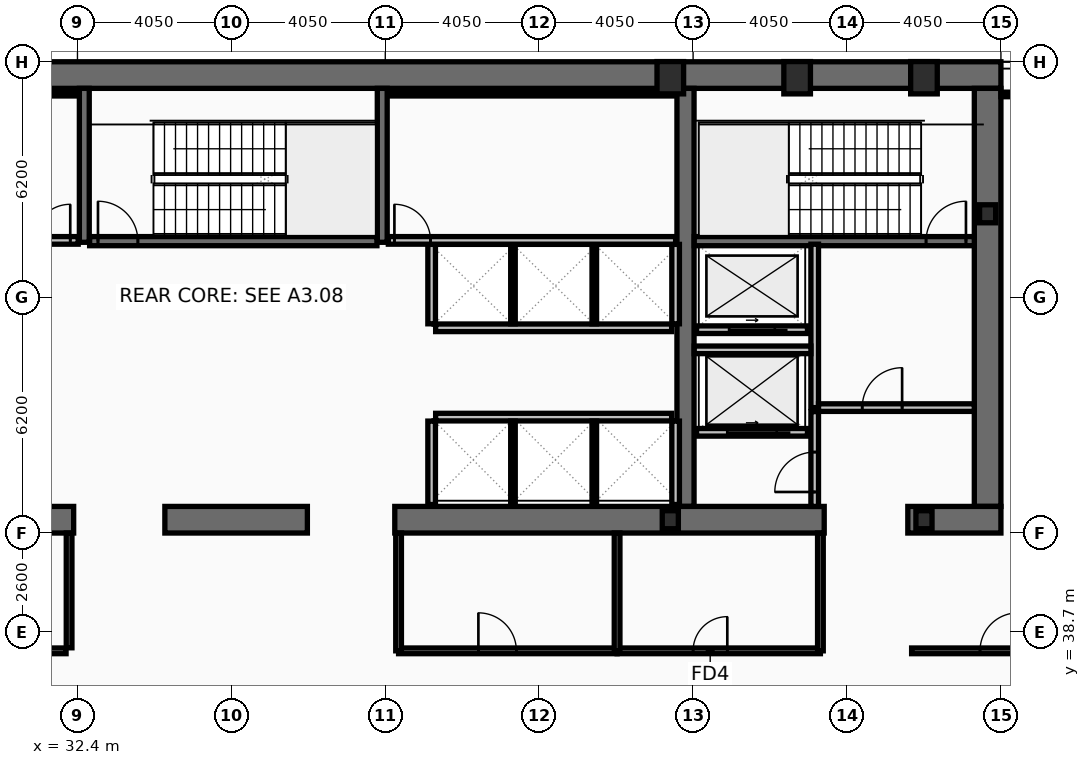
"""IFC4 building model, lengths in metres.
Left out: names, types, materials, properties, quantities, classifications, styles, units other than length and angle.
Written with IfcOpenShell. Run it as: python <this file> out.ifc"""

import sys

from ifc_helpers import new_model, si_unit, direction, frame, frame_2d, origin, origin_2d, place, context, subcontext, project, spatial, rectangle, hollow_rectangle, i_section, extrude, element, fill, save


model = new_model("IFC4")
c1 = context("Model", 3, precision=1e-05, world=origin(), true_north=direction((0.0, 1.0)))
c2 = subcontext(c1, "Body", "Model", "MODEL_VIEW")
j1 = project(units=[si_unit("LENGTHUNIT", "METRE"), si_unit("PLANEANGLEUNIT", "RADIAN")], contexts=[c1])
p1 = place(None, origin())
s1 = spatial("IfcSite", under=j1, at=p1, CompositionType="ELEMENT")
p2 = place(p1, origin())
s2 = spatial("IfcBuilding", under=s1, at=p2, CompositionType="ELEMENT")
p3 = place(p2, frame((0.0, 0.0, 106.6)))
s3 = spatial("IfcBuildingStorey", under=s2, at=p3, CompositionType="ELEMENT", Elevation=106.6)
p4 = place(p3, frame((16.2, 53.35, 0.0), z_axis=(0.0, 0.0, 1.0), x_axis=(1.0, 0.0, 0.0)))
e1 = element("IfcWall", 1, at=p4, inside=s3, PredefinedType="SHEAR", context=c2, shape_type="SweptSolid", body=[
    extrude(rectangle(XDim=40.5, YDim=0.7, at=frame_2d((20.25, 0.0))), origin(), (0.0, 0.0, 1.0), 4.24),
])
p5 = place(p3, frame((56.35, 53.0, 0.0), z_axis=(0.0, 0.0, 1.0), x_axis=(0.0, -1.0, 0.0)))
e2 = element("IfcWall", 2, at=p5, inside=s3, PredefinedType="SHEAR", context=c2, shape_type="SweptSolid", body=[
    extrude(rectangle(XDim=11.0, YDim=0.7, at=frame_2d((5.5, 0.0))), origin(), (0.0, 0.0, 1.0), 4.24),
])
p6 = place(p3, frame((48.4, 42.0, 0.0), z_axis=(0.0, 0.0, 1.0), x_axis=(0.0, 1.0, 0.0)))
e3 = element("IfcWall", 3, at=p6, inside=s3, PredefinedType="SHEAR", context=c2, shape_type="SweptSolid", body=[
    extrude(rectangle(XDim=11.0, YDim=0.45, at=frame_2d((5.5, 0.0))), origin(), (0.0, 0.0, 1.0), 4.24),
])
p7 = place(p3, frame((32.3, 41.65, 0.0), z_axis=(0.0, 0.0, 1.0), x_axis=(-1.0, 0.0, 0.0)))
e4 = element("IfcWall", 4, at=p7, inside=s3, PredefinedType="SHEAR", context=c2, shape_type="SweptSolid", body=[
    extrude(rectangle(XDim=11.45, YDim=0.7, at=frame_2d((5.725, 0.0))), origin(), (0.0, 0.0, 1.0), 4.24),
])
p8 = place(p3, frame((38.45, 41.65, 0.0), z_axis=(0.0, 0.0, 1.0), x_axis=(-1.0, 0.0, 0.0)))
e5 = element("IfcWall", 5, at=p8, inside=s3, PredefinedType="SHEAR", context=c2, shape_type="SweptSolid", body=[
    extrude(rectangle(XDim=3.75, YDim=0.7, at=frame_2d((1.875, 0.0))), origin(), (0.0, 0.0, 1.0), 4.24),
])
p9 = place(p3, frame((52.05, 41.65, 0.0), z_axis=(0.0, 0.0, 1.0), x_axis=(-1.0, 0.0, 0.0)))
e6 = element("IfcWall", 6, at=p9, inside=s3, PredefinedType="SHEAR", context=c2, shape_type="SweptSolid", body=[
    extrude(rectangle(XDim=11.3, YDim=0.7, at=frame_2d((5.65, 0.0))), origin(), (0.0, 0.0, 1.0), 4.24),
])
p10 = place(p3, frame((56.7, 41.65, 0.0), z_axis=(0.0, 0.0, 1.0), x_axis=(-1.0, 0.0, 0.0)))
e7 = element("IfcWall", 7, at=p10, inside=s3, PredefinedType="SHEAR", context=c2, shape_type="SweptSolid", body=[
    extrude(rectangle(XDim=2.45, YDim=0.7, at=frame_2d((1.225, 0.0))), origin(), (0.0, 0.0, 1.0), 4.24),
])
for number, where, z_axis, x_axis in (
    (8, (32.58, 48.95, 0.0), (0.0, 0.0, 1.0), (0.0, 1.0, 0.0)),
    (9, (40.42, 48.95, 0.0), (0.0, 0.0, 1.0), (0.0, 1.0, 0.0)),
):
    element("IfcWall", number, at=place(p3, frame(where, z_axis=z_axis, x_axis=x_axis)), inside=s3, PredefinedType="SHEAR", context=c2, shape_type="SweptSolid", body=[
        extrude(rectangle(XDim=4.05, YDim=0.26, at=frame_2d((2.025, 0.0))), origin(), (0.0, 0.0, 1.0), 4.24),
    ])
p11 = place(p3, frame((48.63, 48.98, 0.0), z_axis=(0.0, 0.0, 1.0), x_axis=(1.0, 0.0, 0.0)))
e10 = element("IfcWall", 10, at=p11, inside=s3, PredefinedType="SHEAR", context=c2, shape_type="SweptSolid", body=[
    extrude(rectangle(XDim=7.37, YDim=0.24, at=frame_2d((3.685, 0.0))), origin(), (0.0, 0.0, 1.0), 4.24),
])
p12 = place(p11, frame((6.1, 0.0, 0.0)))
e11 = element("IfcOpeningElement", 11, at=p12, cuts=e10, PredefinedType="OPENING", context=c2, shape_type="SweptSolid", body=[
    extrude(rectangle(XDim=1.05, YDim=2.15, at=frame_2d((0.525, 1.075))), frame((0.0, 0.13, 0.0), z_axis=(0.0, -1.0, 0.0), x_axis=(1.0, 0.0, 0.0)), (0.0, 0.0, 1.0), 0.26),
])
p13 = place(p3, frame((32.72, 48.98, 0.0), z_axis=(0.0, 0.0, 1.0), x_axis=(1.0, 0.0, 0.0)))
e12 = element("IfcWall", 12, at=p13, inside=s3, PredefinedType="SHEAR", context=c2, shape_type="SweptSolid", body=[
    extrude(rectangle(XDim=7.56, YDim=0.24, at=frame_2d((3.78, 0.0))), origin(), (0.0, 0.0, 1.0), 4.24),
])
p14 = place(p13, frame((0.22, 0.0, 0.0)))
e13 = element("IfcOpeningElement", 13, at=p14, cuts=e12, PredefinedType="OPENING", context=c2, shape_type="SweptSolid", body=[
    extrude(rectangle(XDim=1.05, YDim=2.15, at=frame_2d((0.525, 1.075))), frame((0.0, 0.13, 0.0), z_axis=(0.0, -1.0, 0.0), x_axis=(1.0, 0.0, 0.0)), (0.0, 0.0, 1.0), 0.26),
])
for number, where, z_axis, x_axis in (
    (14, (48.0, 53.28, 0.0), (0.0, 0.0, 1.0), (1.0, 0.0, 0.0)),
    (15, (51.337, 53.28, 0.0), (0.0, 0.0, 1.0), (1.0, 0.0, 0.0)),
    (16, (54.675, 53.28, 0.0), (0.0, 0.0, 1.0), (1.0, 0.0, 0.0)),
):
    element("IfcColumn", number, at=place(p3, frame(where, z_axis=z_axis, x_axis=x_axis)), inside=s3, PredefinedType="COLUMN", context=c2, shape_type="SweptSolid", body=[
        extrude(hollow_rectangle(XDim=0.7, YDim=0.85, WallThickness=0.05, at=origin_2d()), origin(), (0.0, 0.0, 1.0), 4.4),
    ])
for number, where, z_axis, x_axis in (
    (17, (56.35, 49.7, 0.0), (0.0, 0.0, 1.0), (1.0, 0.0, 0.0)),
    (18, (48.0, 41.65, 0.0), (0.0, 0.0, 1.0), (1.0, 0.0, 0.0)),
    (19, (54.675, 41.65, 0.0), (0.0, 0.0, 1.0), (1.0, 0.0, 0.0)),
):
    element("IfcColumn", number, at=place(p3, frame(where, z_axis=z_axis, x_axis=x_axis)), inside=s3, PredefinedType="COLUMN", context=c2, shape_type="SweptSolid", body=[
        extrude(i_section(OverallWidth=0.424, OverallDepth=0.474, WebThickness=0.048, FlangeThickness=0.077, at=origin_2d()), origin(), (0.0, 0.0, 1.0), 4.4),
    ])
p15 = place(p3, frame((51.61, 43.95, 0.0), z_axis=(0.0, 0.0, 1.0), x_axis=(-1.0, 0.0, 0.0)))
e20 = element("IfcWall", 20, at=p15, inside=s3, PredefinedType="PARTITIONING", context=c2, shape_type="SweptSolid", body=[
    extrude(rectangle(XDim=2.92, YDim=0.2, at=frame_2d((1.46, 0.0))), origin(), (0.0, 0.0, 1.0), 4.24),
])
p16 = place(p15, frame((0.81, 0.0, 0.0)))
e21 = element("IfcOpeningElement", 21, at=p16, cuts=e20, PredefinedType="OPENING", context=c2, shape_type="SweptSolid", body=[
    extrude(rectangle(XDim=1.3, YDim=2.18, at=frame_2d((0.65, 1.09))), frame((0.0, 0.11, 0.0), z_axis=(0.0, -1.0, 0.0), x_axis=(1.0, 0.0, 0.0)), (0.0, 0.0, 1.0), 0.22),
])
p17 = place(p3, frame((51.61, 46.65, 0.0), z_axis=(0.0, 0.0, 1.0), x_axis=(-1.0, 0.0, 0.0)))
e22 = element("IfcWall", 22, at=p17, inside=s3, PredefinedType="PARTITIONING", context=c2, shape_type="SweptSolid", body=[
    extrude(rectangle(XDim=2.92, YDim=0.2, at=frame_2d((1.46, 0.0))), origin(), (0.0, 0.0, 1.0), 4.24),
])
p18 = place(p17, frame((0.86, 0.0, 0.0)))
e23 = element("IfcOpeningElement", 23, at=p18, cuts=e22, PredefinedType="OPENING", context=c2, shape_type="SweptSolid", body=[
    extrude(rectangle(XDim=1.2, YDim=2.18, at=frame_2d((0.6, 1.09))), frame((0.0, 0.11, 0.0), z_axis=(0.0, -1.0, 0.0), x_axis=(1.0, 0.0, 0.0)), (0.0, 0.0, 1.0), 0.22),
])
p19 = place(p3, frame((51.8, 44.6, 0.0), z_axis=(0.0, 0.0, 1.0), x_axis=(0.0, 1.0, 0.0)))
e24 = element("IfcWall", 24, at=p19, inside=s3, PredefinedType="PARTITIONING", context=c2, shape_type="SweptSolid", body=[
    extrude(rectangle(XDim=4.3, YDim=0.2, at=frame_2d((2.15, 0.0))), origin(), (0.0, 0.0, 1.0), 4.24),
])
p20 = place(p3, frame((51.9, 44.6, 0.0), z_axis=(0.0, 0.0, 1.0), x_axis=(1.0, 0.0, 0.0)))
e25 = element("IfcWall", 25, at=p20, inside=s3, PredefinedType="PARTITIONING", context=c2, shape_type="SweptSolid", body=[
    extrude(rectangle(XDim=4.1, YDim=0.2, at=frame_2d((2.05, 0.0))), origin(), (0.0, 0.0, 1.0), 4.24),
])
p21 = place(p20, frame((1.15, 0.0, 0.0)))
e26 = element("IfcOpeningElement", 26, at=p21, cuts=e25, PredefinedType="OPENING", context=c2, shape_type="SweptSolid", body=[
    extrude(rectangle(XDim=1.05, YDim=2.15, at=frame_2d((0.525, 1.075))), frame((0.0, 0.11, 0.0), z_axis=(0.0, -1.0, 0.0), x_axis=(1.0, 0.0, 0.0)), (0.0, 0.0, 1.0), 0.22),
])
p22 = place(p3, frame((48.63, 46.12, 0.0), z_axis=(0.0, 0.0, 1.0), x_axis=(1.0, 0.0, 0.0)))
e27 = element("IfcWall", 27, at=p22, inside=s3, PredefinedType="PARTITIONING", context=c2, shape_type="SweptSolid", body=[
    extrude(rectangle(XDim=3.07, YDim=0.2, at=frame_2d((1.535, 0.0))), origin(), (0.0, 0.0, 1.0), 4.24),
])
p23 = place(p3, frame((51.8, 42.0, 0.0), z_axis=(0.0, 0.0, 1.0), x_axis=(0.0, 1.0, 0.0)))
e28 = element("IfcWall", 28, at=p23, inside=s3, PredefinedType="PARTITIONING", context=c2, shape_type="SweptSolid", body=[
    extrude(rectangle(XDim=2.495, YDim=0.2, at=frame_2d((1.248, 0.0))), origin(), (0.0, 0.0, 1.0), 4.24),
])
p24 = place(p23, frame((0.38, 0.0, 0.0)))
e29 = element("IfcOpeningElement", 29, at=p24, cuts=e28, PredefinedType="OPENING", context=c2, shape_type="SweptSolid", body=[
    extrude(rectangle(XDim=1.05, YDim=2.15, at=frame_2d((0.525, 1.075))), frame((0.0, 0.11, 0.0), z_axis=(0.0, -1.0, 0.0), x_axis=(1.0, 0.0, 0.0)), (0.0, 0.0, 1.0), 0.22),
])
p25 = place(p3, frame((41.825, 46.7, 0.0), z_axis=(0.0, 0.0, 1.0), x_axis=(1.0, 0.0, 0.0)))
e30 = element("IfcWall", 30, at=p25, inside=s3, PredefinedType="PARTITIONING", context=c2, shape_type="SweptSolid", body=[
    extrude(rectangle(XDim=6.21, YDim=0.2, at=frame_2d((3.105, 0.0))), origin(), (0.0, 0.0, 1.0), 4.24),
])
for number, where, z_axis, x_axis in (
    (31, (41.72, 46.805, 0.0), (0.0, 0.0, 1.0), (0.0, 1.0, 0.0)),
    (32, (48.14, 46.805, 0.0), (0.0, 0.0, 1.0), (0.0, 1.0, 0.0)),
):
    element("IfcWall", number, at=place(p3, frame(where, z_axis=z_axis, x_axis=x_axis)), inside=s3, PredefinedType="PARTITIONING", context=c2, shape_type="SweptSolid", body=[
        extrude(rectangle(XDim=2.09, YDim=0.2, at=frame_2d((1.045, 0.0))), origin(), (0.0, 0.0, 1.0), 4.24),
    ])
for number, where, z_axis, x_axis in (
    (33, (43.86, 46.805, 0.0), (0.0, 0.0, 1.0), (0.0, 1.0, 0.0)),
    (34, (46.0, 46.805, 0.0), (0.0, 0.0, 1.0), (0.0, 1.0, 0.0)),
):
    element("IfcWall", number, at=place(p3, frame(where, z_axis=z_axis, x_axis=x_axis)), inside=s3, PredefinedType="PARTITIONING", context=c2, shape_type="SweptSolid", body=[
        extrude(rectangle(XDim=2.09, YDim=0.12, at=frame_2d((1.045, 0.0))), origin(), (0.0, 0.0, 1.0), 4.24),
    ])
p26 = place(p3, frame((41.825, 44.35, 0.0), z_axis=(0.0, 0.0, 1.0), x_axis=(1.0, 0.0, 0.0)))
e35 = element("IfcWall", 35, at=p26, inside=s3, PredefinedType="PARTITIONING", context=c2, shape_type="SweptSolid", body=[
    extrude(rectangle(XDim=6.21, YDim=0.2, at=frame_2d((3.105, 0.0))), origin(), (0.0, 0.0, 1.0), 4.24),
])
for number, where, z_axis, x_axis in (
    (36, (41.72, 42.05, 0.0), (0.0, 0.0, 1.0), (0.0, 1.0, 0.0)),
    (37, (48.14, 42.05, 0.0), (0.0, 0.0, 1.0), (0.0, 1.0, 0.0)),
):
    element("IfcWall", number, at=place(p3, frame(where, z_axis=z_axis, x_axis=x_axis)), inside=s3, PredefinedType="PARTITIONING", context=c2, shape_type="SweptSolid", body=[
        extrude(rectangle(XDim=2.195, YDim=0.2, at=frame_2d((1.098, 0.0))), origin(), (0.0, 0.0, 1.0), 4.24),
    ])
for number, where, z_axis, x_axis in (
    (38, (43.86, 42.05, 0.0), (0.0, 0.0, 1.0), (0.0, 1.0, 0.0)),
    (39, (46.0, 42.05, 0.0), (0.0, 0.0, 1.0), (0.0, 1.0, 0.0)),
):
    element("IfcWall", number, at=place(p3, frame(where, z_axis=z_axis, x_axis=x_axis)), inside=s3, PredefinedType="PARTITIONING", context=c2, shape_type="SweptSolid", body=[
        extrude(rectangle(XDim=2.195, YDim=0.12, at=frame_2d((1.098, 0.0))), origin(), (0.0, 0.0, 1.0), 4.24),
    ])
p27 = place(p3, frame((24.7, 52.86, 0.0), z_axis=(0.0, 0.0, 1.0), x_axis=(1.0, 0.0, 0.0)))
e40 = element("IfcWall", 40, at=p27, inside=s3, PredefinedType="PARTITIONING", context=c2, shape_type="SweptSolid", body=[
    extrude(rectangle(XDim=7.72, YDim=0.12, at=frame_2d((3.86, 0.0))), origin(), (0.0, 0.0, 1.0), 4.24),
])
p28 = place(p3, frame((24.7, 49.0, 0.0), z_axis=(0.0, 0.0, 1.0), x_axis=(1.0, 0.0, 0.0)))
e41 = element("IfcWall", 41, at=p28, inside=s3, PredefinedType="PARTITIONING", context=c2, shape_type="SweptSolid", body=[
    extrude(rectangle(XDim=7.72, YDim=0.2, at=frame_2d((3.86, 0.0))), origin(), (0.0, 0.0, 1.0), 4.24),
])
p29 = place(p28, frame((6.56, 0.0, 0.0)))
e42 = element("IfcOpeningElement", 42, at=p29, cuts=e41, PredefinedType="OPENING", context=c2, shape_type="SweptSolid", body=[
    extrude(rectangle(XDim=0.95, YDim=2.1, at=frame_2d((0.475, 1.05))), frame((0.0, 0.11, 0.0), z_axis=(0.0, -1.0, 0.0), x_axis=(1.0, 0.0, 0.0)), (0.0, 0.0, 1.0), 0.22),
])
p30 = place(p3, frame((40.58, 52.86, 0.0), z_axis=(0.0, 0.0, 1.0), x_axis=(1.0, 0.0, 0.0)))
e43 = element("IfcWall", 43, at=p30, inside=s3, PredefinedType="PARTITIONING", context=c2, shape_type="SweptSolid", body=[
    extrude(rectangle(XDim=7.56, YDim=0.12, at=frame_2d((3.78, 0.0))), origin(), (0.0, 0.0, 1.0), 4.24),
])
p31 = place(p3, frame((40.58, 49.0, 0.0), z_axis=(0.0, 0.0, 1.0), x_axis=(1.0, 0.0, 0.0)))
e44 = element("IfcWall", 44, at=p31, inside=s3, PredefinedType="PARTITIONING", context=c2, shape_type="SweptSolid", body=[
    extrude(rectangle(XDim=7.56, YDim=0.2, at=frame_2d((3.78, 0.0))), origin(), (0.0, 0.0, 1.0), 4.24),
])
p32 = place(p31, frame((0.16, 0.0, 0.0)))
e45 = element("IfcOpeningElement", 45, at=p32, cuts=e44, PredefinedType="OPENING", context=c2, shape_type="SweptSolid", body=[
    extrude(rectangle(XDim=0.95, YDim=2.1, at=frame_2d((0.475, 1.05))), frame((0.0, 0.11, 0.0), z_axis=(0.0, -1.0, 0.0), x_axis=(1.0, 0.0, 0.0)), (0.0, 0.0, 1.0), 0.22),
])
p33 = place(p3, frame((29.08, 38.2, 0.0), z_axis=(0.0, 0.0, 1.0), x_axis=(1.0, 0.0, 0.0)))
e46 = element("IfcWall", 46, at=p33, inside=s3, PredefinedType="PARTITIONING", context=c2, shape_type="SweptSolid", body=[
    extrude(rectangle(XDim=3.02, YDim=0.15, at=frame_2d((1.51, 0.0))), origin(), (0.0, 0.0, 1.0), 3.53),
])
p34 = place(p33, frame((1.0, 0.0, 0.0)))
e47 = element("IfcOpeningElement", 47, at=p34, cuts=e46, PredefinedType="OPENING", context=c2, shape_type="SweptSolid", body=[
    extrude(rectangle(XDim=0.95, YDim=2.05, at=frame_2d((0.475, 1.025))), frame((0.0, 0.085, 0.0), z_axis=(0.0, -1.0, 0.0), x_axis=(1.0, 0.0, 0.0)), (0.0, 0.0, 1.0), 0.17),
])
p35 = place(p3, frame((32.18, 38.28, 0.0), z_axis=(0.0, 0.0, 1.0), x_axis=(0.0, 1.0, 0.0)))
e48 = element("IfcWall", 48, at=p35, inside=s3, PredefinedType="PARTITIONING", context=c2, shape_type="SweptSolid", body=[
    extrude(rectangle(XDim=3.02, YDim=0.15, at=frame_2d((1.51, 0.0))), origin(), (0.0, 0.0, 1.0), 4.24),
])
p36 = place(p3, frame((40.85, 38.2, 0.0), z_axis=(0.0, 0.0, 1.0), x_axis=(1.0, 0.0, 0.0)))
e49 = element("IfcWall", 49, at=p36, inside=s3, PredefinedType="PARTITIONING", context=c2, shape_type="SweptSolid", body=[
    extrude(rectangle(XDim=5.75, YDim=0.15, at=frame_2d((2.875, 0.0))), origin(), (0.0, 0.0, 1.0), 3.53),
])
p37 = place(p36, frame((2.1, 0.0, 0.0)))
e50 = element("IfcOpeningElement", 50, at=p37, cuts=e49, PredefinedType="OPENING", context=c2, shape_type="SweptSolid", body=[
    extrude(rectangle(XDim=1.0, YDim=2.05, at=frame_2d((0.5, 1.025))), frame((0.0, 0.085, 0.0), z_axis=(0.0, -1.0, 0.0), x_axis=(1.0, 0.0, 0.0)), (0.0, 0.0, 1.0), 0.17),
])
p38 = place(p3, frame((46.6, 38.2, 0.0), z_axis=(0.0, 0.0, 1.0), x_axis=(1.0, 0.0, 0.0)))
e51 = element("IfcWall", 51, at=p38, inside=s3, PredefinedType="PARTITIONING", context=c2, shape_type="SweptSolid", body=[
    extrude(rectangle(XDim=5.35, YDim=0.15, at=frame_2d((2.675, 0.0))), origin(), (0.0, 0.0, 1.0), 3.53),
])
p39 = place(p38, frame((2.0, 0.0, 0.0)))
e52 = element("IfcOpeningElement", 52, at=p39, cuts=e51, PredefinedType="OPENING", context=c2, shape_type="SweptSolid", body=[
    extrude(rectangle(XDim=0.9, YDim=2.05, at=frame_2d((0.45, 1.025))), frame((0.0, 0.085, 0.0), z_axis=(0.0, -1.0, 0.0), x_axis=(1.0, 0.0, 0.0)), (0.0, 0.0, 1.0), 0.17),
])
for number, where, z_axis, x_axis in (
    (53, (40.85, 38.2, 0.0), (0.0, 0.0, 1.0), (0.0, 1.0, 0.0)),
    (54, (46.6, 38.2, 0.0), (0.0, 0.0, 1.0), (0.0, 1.0, 0.0)),
    (55, (51.95, 38.2, 0.0), (0.0, 0.0, 1.0), (0.0, 1.0, 0.0)),
):
    element("IfcWall", number, at=place(p3, frame(where, z_axis=z_axis, x_axis=x_axis)), inside=s3, PredefinedType="PARTITIONING", context=c2, shape_type="SweptSolid", body=[
        extrude(rectangle(XDim=3.1, YDim=0.15, at=frame_2d((1.55, 0.0))), origin(), (0.0, 0.0, 1.0), 4.24),
    ])
p40 = place(p3, frame((54.35, 38.2, 0.0), z_axis=(0.0, 0.0, 1.0), x_axis=(1.0, 0.0, 0.0)))
e56 = element("IfcWall", 56, at=p40, inside=s3, PredefinedType="PARTITIONING", context=c2, shape_type="SweptSolid", body=[
    extrude(rectangle(XDim=14.52, YDim=0.15, at=frame_2d((7.26, 0.0))), origin(), (0.0, 0.0, 1.0), 3.53),
])
p41 = place(p40, frame((1.8, 0.0, 0.0)))
e57 = element("IfcOpeningElement", 57, at=p41, cuts=e56, PredefinedType="OPENING", context=c2, shape_type="SweptSolid", body=[
    extrude(rectangle(XDim=1.0, YDim=2.05, at=frame_2d((0.5, 1.025))), frame((0.0, 0.085, 0.0), z_axis=(0.0, -1.0, 0.0), x_axis=(1.0, 0.0, 0.0)), (0.0, 0.0, 1.0), 0.17),
])
p42 = place(p3, frame((56.7, 52.84, 0.0), z_axis=(0.0, 0.0, 1.0), x_axis=(1.0, 0.0, 0.0)))
e58 = element("IfcWall", 58, at=p42, inside=s3, PredefinedType="PARTITIONING", context=c2, shape_type="SweptSolid", body=[
    extrude(rectangle(XDim=12.105, YDim=0.12, at=frame_2d((6.052, 0.0))), origin(), (0.0, 0.0, 1.0), 4.24),
])
p43 = place(p12, origin())
e59 = element("IfcDoor", 59, at=p43, inside=s3, OperationType="SINGLE_SWING_RIGHT", PredefinedType="DOOR", context=c2, shape_type="SweptSolid", body=[
    extrude(rectangle(XDim=1.05, YDim=2.15, at=frame_2d((0.525, 1.075))), frame((0.0, 0.025, 0.0), z_axis=(0.0, -1.0, 0.0), x_axis=(1.0, 0.0, 0.0)), (0.0, 0.0, 1.0), 0.05),
])
fill(e11, e59)
p44 = place(p14, origin())
e60 = element("IfcDoor", 60, at=p44, inside=s3, OperationType="SINGLE_SWING_LEFT", PredefinedType="DOOR", context=c2, shape_type="SweptSolid", body=[
    extrude(rectangle(XDim=1.05, YDim=2.15, at=frame_2d((0.525, 1.075))), frame((0.0, 0.025, 0.0), z_axis=(0.0, -1.0, 0.0), x_axis=(1.0, 0.0, 0.0)), (0.0, 0.0, 1.0), 0.05),
])
fill(e13, e60)
p45 = place(p16, origin())
e61 = element("IfcDoor", 61, at=p45, inside=s3, OperationType="SLIDING_TO_LEFT", PredefinedType="DOOR", context=c2, shape_type="SweptSolid", body=[
    extrude(rectangle(XDim=1.3, YDim=2.18, at=frame_2d((0.65, 1.09))), frame((0.0, 0.025, 0.0), z_axis=(0.0, -1.0, 0.0), x_axis=(1.0, 0.0, 0.0)), (0.0, 0.0, 1.0), 0.05),
])
fill(e21, e61)
p46 = place(p18, origin())
e62 = element("IfcDoor", 62, at=p46, inside=s3, OperationType="SLIDING_TO_LEFT", PredefinedType="DOOR", context=c2, shape_type="SweptSolid", body=[
    extrude(rectangle(XDim=1.2, YDim=2.18, at=frame_2d((0.6, 1.09))), frame((0.0, 0.025, 0.0), z_axis=(0.0, -1.0, 0.0), x_axis=(1.0, 0.0, 0.0)), (0.0, 0.0, 1.0), 0.05),
])
fill(e23, e62)
p47 = place(p21, origin())
e63 = element("IfcDoor", 63, at=p47, inside=s3, OperationType="SINGLE_SWING_RIGHT", PredefinedType="DOOR", context=c2, shape_type="SweptSolid", body=[
    extrude(rectangle(XDim=1.05, YDim=2.15, at=frame_2d((0.525, 1.075))), frame((0.0, 0.025, 0.0), z_axis=(0.0, -1.0, 0.0), x_axis=(1.0, 0.0, 0.0)), (0.0, 0.0, 1.0), 0.05),
])
fill(e26, e63)
p48 = place(p24, origin())
e64 = element("IfcDoor", 64, at=p48, inside=s3, OperationType="SINGLE_SWING_LEFT", PredefinedType="DOOR", context=c2, shape_type="SweptSolid", body=[
    extrude(rectangle(XDim=1.05, YDim=2.15, at=frame_2d((0.525, 1.075))), frame((0.0, 0.025, 0.0), z_axis=(0.0, -1.0, 0.0), x_axis=(1.0, 0.0, 0.0)), (0.0, 0.0, 1.0), 0.05),
])
fill(e29, e64)
p49 = place(p29, origin())
e65 = element("IfcDoor", 65, at=p49, inside=s3, OperationType="SINGLE_SWING_RIGHT", PredefinedType="DOOR", context=c2, shape_type="SweptSolid", body=[
    extrude(rectangle(XDim=0.95, YDim=2.1, at=frame_2d((0.475, 1.05))), frame((0.0, 0.025, 0.0), z_axis=(0.0, -1.0, 0.0), x_axis=(1.0, 0.0, 0.0)), (0.0, 0.0, 1.0), 0.05),
])
fill(e42, e65)
p50 = place(p32, origin())
e66 = element("IfcDoor", 66, at=p50, inside=s3, OperationType="SINGLE_SWING_LEFT", PredefinedType="DOOR", context=c2, shape_type="SweptSolid", body=[
    extrude(rectangle(XDim=0.95, YDim=2.1, at=frame_2d((0.475, 1.05))), frame((0.0, 0.025, 0.0), z_axis=(0.0, -1.0, 0.0), x_axis=(1.0, 0.0, 0.0)), (0.0, 0.0, 1.0), 0.05),
])
fill(e45, e66)
p51 = place(p37, origin())
e67 = element("IfcDoor", 67, at=p51, inside=s3, OperationType="SINGLE_SWING_LEFT", PredefinedType="DOOR", context=c2, shape_type="SweptSolid", body=[
    extrude(rectangle(XDim=1.0, YDim=2.05, at=frame_2d((0.5, 1.025))), frame((0.0, 0.025, 0.0), z_axis=(0.0, -1.0, 0.0), x_axis=(1.0, 0.0, 0.0)), (0.0, 0.0, 1.0), 0.05),
])
fill(e50, e67)
p52 = place(p39, origin())
e68 = element("IfcDoor", 68, at=p52, inside=s3, OperationType="SINGLE_SWING_RIGHT", PredefinedType="DOOR", context=c2, shape_type="SweptSolid", body=[
    extrude(rectangle(XDim=0.9, YDim=2.05, at=frame_2d((0.45, 1.025))), frame((0.0, 0.025, 0.0), z_axis=(0.0, -1.0, 0.0), x_axis=(1.0, 0.0, 0.0)), (0.0, 0.0, 1.0), 0.05),
])
fill(e52, e68)
p53 = place(p41, origin())
e69 = element("IfcDoor", 69, at=p53, inside=s3, OperationType="SINGLE_SWING_RIGHT", PredefinedType="DOOR", context=c2, shape_type="SweptSolid", body=[
    extrude(rectangle(XDim=1.0, YDim=2.05, at=frame_2d((0.5, 1.025))), frame((0.0, 0.025, 0.0), z_axis=(0.0, -1.0, 0.0), x_axis=(1.0, 0.0, 0.0)), (0.0, 0.0, 1.0), 0.05),
])
fill(e57, e69)
save(model, sys.argv[1])
